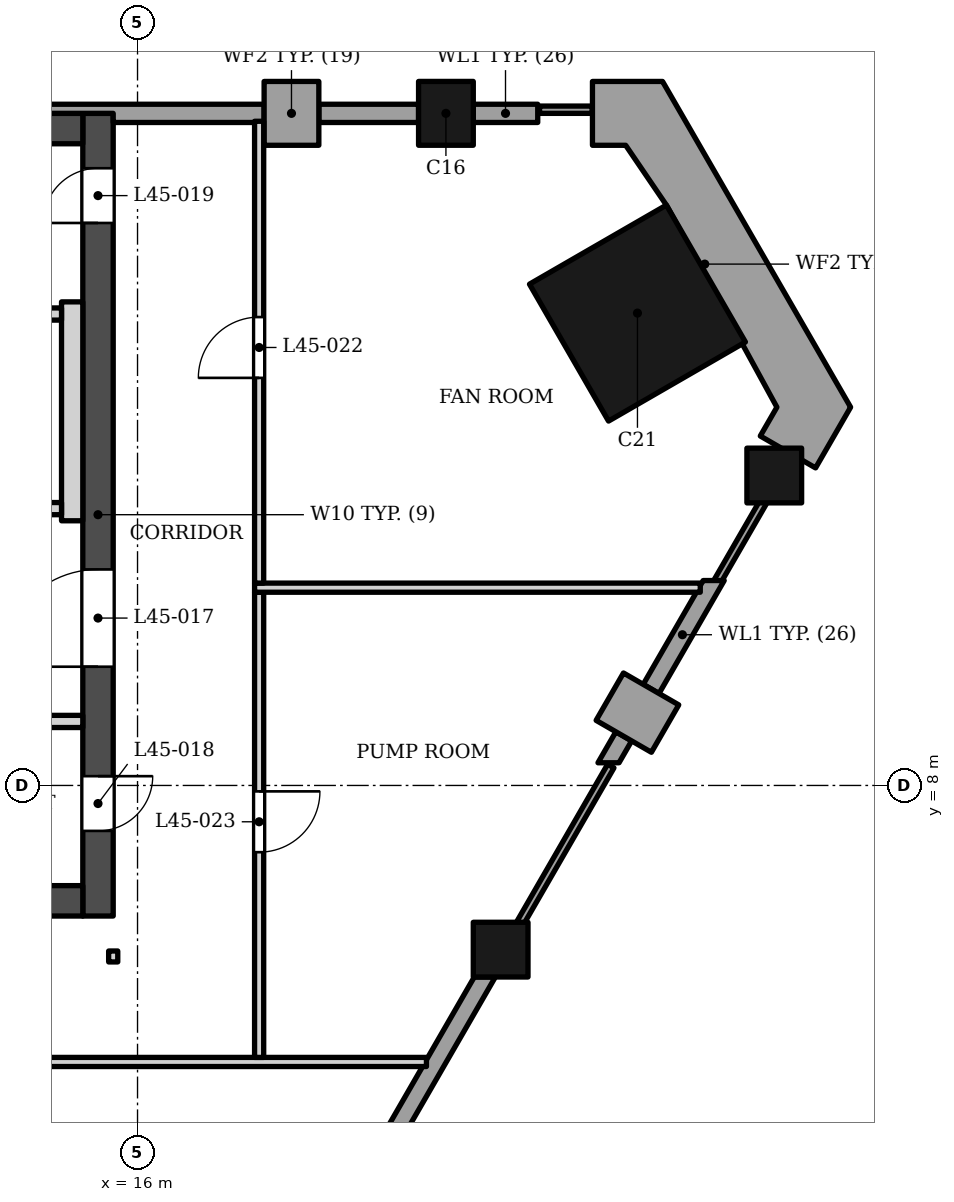
"""IFC4 building model, lengths in metres.
Left out: names, types, materials, properties, quantities, classifications, styles, units other than length and angle.
Written with IfcOpenShell. Run it as: python <this file> out.ifc"""

import sys

from ifc_helpers import new_model, si_unit, direction, frame, frame_2d, origin, origin_2d, place, context, subcontext, project, spatial, polyline, rectangle, outline, extrude, clip, halfspace, element, fill, save


model = new_model("IFC4")
c1 = context("Model", 3, precision=1e-05, world=origin(), true_north=direction((0.0, 1.0)))
c2 = subcontext(c1, "Body", "Model", "MODEL_VIEW")
j1 = project(units=[si_unit("LENGTHUNIT", "METRE"), si_unit("PLANEANGLEUNIT", "RADIAN")], contexts=[c1])
p1 = place(None, origin())
s1 = spatial("IfcSite", under=j1, at=p1, CompositionType="ELEMENT")
p2 = place(p1, origin())
s2 = spatial("IfcBuilding", under=s1, at=p2, CompositionType="ELEMENT")
p3 = place(p2, frame((0.0, 0.0, 191.4)))
s3 = spatial("IfcBuildingStorey", under=s2, at=p3, CompositionType="ELEMENT", Elevation=191.4)
p4 = place(p3, frame((-15.1, 18.802, 0.0), z_axis=(0.0, 0.0, 1.0), x_axis=(1.0, 0.0, 0.0)))
e1 = element("IfcWall", 1, at=p4, inside=s3, PredefinedType="SHEAR", context=c2, shape_type="SweptSolid", body=[
    extrude(rectangle(XDim=30.2, YDim=0.5, at=frame_2d((15.1, 0.0))), origin(), (0.0, 0.0, 1.0), 5.0),
])
p5 = place(p3, frame((12.6, 6.103, 0.0), z_axis=(0.0, 0.0, 1.0), x_axis=(1.0, 0.0, 0.0)))
e2 = element("IfcWall", 2, at=p5, inside=s3, PredefinedType="SHEAR", context=c2, shape_type="SweptSolid", body=[
    extrude(rectangle(XDim=2.5, YDim=0.5, at=frame_2d((1.25, 0.0))), origin(), (0.0, 0.0, 1.0), 5.0),
])
p6 = place(p3, frame((15.35, 5.853, 0.0), z_axis=(0.0, 0.0, 1.0), x_axis=(0.0, 1.0, 0.0)))
e3 = element("IfcWall", 3, at=p6, inside=s3, PredefinedType="SHEAR", context=c2, shape_type="SweptSolid", body=[
    extrude(rectangle(XDim=13.2, YDim=0.5, at=frame_2d((6.6, 0.0))), origin(), (0.0, 0.0, 1.0), 5.0),
])
p7 = place(p6, frame((4.1, 0.0, 0.0)))
e4 = element("IfcOpeningElement", 4, at=p7, cuts=e3, PredefinedType="OPENING", context=c2, shape_type="SweptSolid", body=[
    extrude(rectangle(XDim=1.6, YDim=2.1, at=frame_2d((0.8, 1.05))), frame((0.0, 0.26, 0.0), z_axis=(0.0, -1.0, 0.0), x_axis=(1.0, 0.0, 0.0)), (0.0, 0.0, 1.0), 0.52),
])
p8 = place(p6, frame((1.4, 0.0, 0.0)))
e5 = element("IfcOpeningElement", 5, at=p8, cuts=e3, PredefinedType="OPENING", context=c2, shape_type="SweptSolid", body=[
    extrude(rectangle(XDim=0.9, YDim=2.1, at=frame_2d((0.45, 1.05))), frame((0.0, 0.26, 0.0), z_axis=(0.0, -1.0, 0.0), x_axis=(1.0, 0.0, 0.0)), (0.0, 0.0, 1.0), 0.52),
])
p9 = place(p6, frame((11.397, 0.0, 0.0)))
e6 = element("IfcOpeningElement", 6, at=p9, cuts=e3, PredefinedType="OPENING", context=c2, shape_type="SweptSolid", body=[
    extrude(rectangle(XDim=0.9, YDim=2.1, at=frame_2d((0.45, 1.05))), frame((0.0, 0.26, 0.0), z_axis=(0.0, -1.0, 0.0), x_axis=(1.0, 0.0, 0.0)), (0.0, 0.0, 1.0), 0.52),
])
p10 = place(p3, frame((21.072, 19.053, 0.0), z_axis=(0.0, 0.0, 1.0), x_axis=(-1.0, 0.0, 0.0)))
e7 = element("IfcColumn", 7, at=p10, inside=s3, PredefinedType="COLUMN", context=c2, shape_type="SweptSolid", body=[
    extrude(rectangle(XDim=0.9, YDim=1.05, at=origin_2d()), origin(), (0.0, 0.0, 1.0), 5.0),
])
p11 = place(p3, frame((24.222, 15.768, 0.0), z_axis=(0.0, 0.0, 1.0), x_axis=(-0.866025421238, -0.49999996977, 0.0)))
e8 = element("IfcColumn", 8, at=p11, inside=s3, PredefinedType="COLUMN", context=c2, shape_type="SweptSolid", body=[
    extrude(rectangle(XDim=2.6, YDim=2.6, at=origin_2d()), origin(), (0.0, 0.0, 1.0), 5.0),
])
p12 = place(p3, frame((21.972, 5.3, 0.0), z_axis=(0.259017976058, 0.448708341627, 0.85531895351), x_axis=(-0.86606209647, 0.499936441019, 0.0)))
e9 = element("IfcColumn", 9, at=p12, inside=s3, PredefinedType="COLUMN", context=c2, shape_type="Clipping", body=[
    clip(clip(extrude(rectangle(XDim=0.9, YDim=0.9, at=origin_2d()), origin(), (0.0, 0.0, 1.0), 5.846), halfspace(frame((0.0, 0.0, 0.277), z_axis=(0.0, 0.0, 1.0), x_axis=(1.0, 0.0, 0.0)), True)), halfspace(frame((0.0, 0.0, 5.569), z_axis=(0.0, 0.0, 1.0), x_axis=(1.0, 0.0, 0.0)), False)),
])
p13 = place(p3, frame((26.472, 13.097, 0.0), z_axis=(-0.141163992938, -0.244952781375, 0.959203243319), x_axis=(0.866422676659, -0.499311271023, 0.0)))
e10 = element("IfcColumn", 10, at=p13, inside=s3, PredefinedType="COLUMN", context=c2, shape_type="Clipping", body=[
    clip(clip(extrude(rectangle(XDim=0.9, YDim=0.9, at=origin_2d()), origin(), (0.0, 0.0, 1.0), 5.213), halfspace(frame((0.0, 0.0, 0.137), z_axis=(0.0, 0.0, 1.0), x_axis=(1.0, 0.0, 0.0)), True)), halfspace(frame((0.0, 0.0, 5.076), z_axis=(0.0, 0.0, 1.0), x_axis=(1.0, 0.0, 0.0)), False)),
])
p14 = place(p3, frame((24.676, 8.935, 0.0), z_axis=(0.0, 0.0, 1.0), x_axis=(-0.866030680601, 0.499990860175, 0.0)))
e11 = element("IfcWall", 11, at=p14, inside=s3, PredefinedType="SOLIDWALL", context=c2, shape_type="SweptSolid", body=[
    extrude(rectangle(XDim=1.05, YDim=0.9, at=frame_2d((0.525, 0.0))), origin(), (0.0, 0.0, 1.0), 3.5),
])
p15 = place(p3, origin())
e12 = element("IfcWall", 12, at=p15, inside=s3, PredefinedType="ELEMENTEDWALL", context=c2, shape_type="SweptSolid", body=[
    extrude(outline(polyline([(21.877, 4.836), (21.852, 4.85), (21.538, 4.85), (19.817, 1.868), (20.077, 1.718), (21.877, 4.836)])), origin(), (0.0, 0.0, 1.0), 3.5),
])
p16 = place(p3, origin())
e13 = element("IfcWall", 13, at=p16, inside=s3, PredefinedType="ELEMENTEDWALL", context=c2, shape_type="SweptSolid", body=[
    extrude(outline(polyline([(23.867, 8.883), (23.573, 8.373), (23.919, 8.373), (24.127, 8.733), (23.867, 8.883)])), origin(), (0.0, 0.0, 1.0), 3.5),
])
p17 = place(p3, origin())
e14 = element("IfcWall", 14, at=p17, inside=s3, PredefinedType="ELEMENTEDWALL", context=c2, shape_type="SweptSolid", body=[
    extrude(outline(polyline([(24.577, 9.512), (25.649, 11.37), (25.303, 11.37), (24.317, 9.662), (24.577, 9.512)])), origin(), (0.0, 0.0, 1.0), 3.5),
])
p18 = place(p3, origin())
e15 = element("IfcWall", 15, at=p18, inside=s3, PredefinedType="SOLIDWALL", context=c2, shape_type="SweptSolid", body=[
    extrude(outline(polyline([(18.082, 18.528), (18.982, 18.528), (18.982, 19.578), (18.082, 19.578), (18.082, 18.528)])), origin(), (0.0, 0.0, 1.0), 3.5),
])
p19 = place(p3, origin())
e16 = element("IfcWall", 16, at=p19, inside=s3, PredefinedType="ELEMENTEDWALL", context=c2, shape_type="SweptSolid", body=[
    extrude(outline(polyline([(22.582, 19.203), (21.522, 19.203), (21.522, 18.903), (22.582, 18.903), (22.582, 19.203)])), origin(), (0.0, 0.0, 1.0), 3.5),
])
p20 = place(p3, origin())
e17 = element("IfcWall", 17, at=p20, inside=s3, PredefinedType="ELEMENTEDWALL", context=c2, shape_type="SweptSolid", body=[
    extrude(outline(polyline([(18.982, 18.903), (20.622, 18.903), (20.622, 19.203), (18.982, 19.203), (18.982, 18.903)])), origin(), (0.0, 0.0, 1.0), 3.5),
])
p21 = place(p3, origin())
e18 = element("IfcWall", 18, at=p21, inside=s3, PredefinedType="ELEMENTEDWALL", context=c2, shape_type="SweptSolid", body=[
    extrude(outline(polyline([(18.082, 19.203), (14.482, 19.203), (14.482, 19.052), (15.6, 19.052), (15.6, 18.903), (18.082, 18.903), (18.082, 19.203)])), origin(), (0.0, 0.0, 1.0), 3.5),
])
p22 = place(p3, origin())
e19 = element("IfcWall", 19, at=p22, inside=s3, PredefinedType="SOLIDWALL", context=c2, shape_type="SweptSolid", body=[
    extrude(outline(polyline([(26.242, 13.747), (27.151, 13.222), (27.728, 14.22), (24.635, 19.578), (23.482, 19.578), (23.482, 18.528), (24.029, 18.528), (24.698, 17.544), (26.515, 14.22), (26.242, 13.747)])), origin(), (0.0, 0.0, 1.0), 3.5),
])
p23 = place(p3, frame((22.216, 5.604, 0.0), z_axis=(0.0, 0.0, 1.0), x_axis=(0.499958394027, 0.866049423672, 0.0)))
e20 = element("IfcWall", 20, at=p23, inside=s3, PredefinedType="SOLIDWALL", context=c2, shape_type="SweptSolid", body=[
    extrude(rectangle(XDim=3.135, YDim=0.12, at=frame_2d((1.567, 0.0))), origin(), (0.0, 0.0, 1.0), 3.5),
])
p24 = place(p3, frame((25.539, 11.359, 0.0), z_axis=(0.0, 0.0, 1.0), x_axis=(0.500077627542, 0.865980580863, 0.0)))
e21 = element("IfcWall", 21, at=p24, inside=s3, PredefinedType="SOLIDWALL", context=c2, shape_type="SweptSolid", body=[
    extrude(rectangle(XDim=1.587, YDim=0.12, at=frame_2d((0.793, 0.0))), origin(), (0.0, 0.0, 1.0), 3.5),
])
p25 = place(p3, frame((22.612, 19.113, 0.0), z_axis=(0.0, 0.0, 1.0), x_axis=(1.0, 0.0, 0.0)))
e22 = element("IfcWall", 22, at=p25, inside=s3, PredefinedType="SOLIDWALL", context=c2, shape_type="SweptSolid", body=[
    extrude(rectangle(XDim=0.866, YDim=0.12, at=frame_2d((0.433, 0.0))), origin(), (0.0, 0.0, 1.0), 3.5),
])
p26 = place(p3, frame((12.6, 9.052, 0.0), z_axis=(0.0, 0.0, 1.0), x_axis=(1.0, 0.0, 0.0)))
e23 = element("IfcWall", 23, at=p26, inside=s3, PredefinedType="PARTITIONING", context=c2, shape_type="SweptSolid", body=[
    extrude(rectangle(XDim=2.5, YDim=0.2, at=frame_2d((1.25, 0.0))), origin(), (0.0, 0.0, 1.0), 4.83),
])
p27 = place(p3, frame((14.925, 12.353, 0.0), z_axis=(0.0, 0.0, 1.0), x_axis=(0.0, 1.0, 0.0)))
e24 = element("IfcWall", 24, at=p27, inside=s3, PredefinedType="SOLIDWALL", context=c2, shape_type="SweptSolid", body=[
    extrude(rectangle(XDim=3.6, YDim=0.35, at=frame_2d((1.8, 0.0))), origin(), (0.0, 0.0, 1.0), 4.83),
])
p28 = place(p3, frame((12.6, 12.552, 0.0), z_axis=(0.0, 0.0, 1.0), x_axis=(1.0, 0.0, 0.0)))
e25 = element("IfcWall", 25, at=p28, inside=s3, PredefinedType="SOLIDWALL", context=c2, shape_type="SweptSolid", body=[
    extrude(rectangle(XDim=2.15, YDim=0.2, at=frame_2d((1.075, 0.0))), origin(), (0.0, 0.0, 1.0), 4.83),
])
p29 = place(p28, frame((0.475, 0.0, 0.0)))
e26 = element("IfcOpeningElement", 26, at=p29, cuts=e25, PredefinedType="OPENING", context=c2, shape_type="SweptSolid", body=[
    extrude(rectangle(XDim=1.2, YDim=2.1, at=frame_2d((0.6, 1.05))), frame((0.0, 0.11, 0.0), z_axis=(0.0, -1.0, 0.0), x_axis=(1.0, 0.0, 0.0)), (0.0, 0.0, 1.0), 0.22),
])
p30 = place(p3, frame((12.6, 15.753, 0.0), z_axis=(0.0, 0.0, 1.0), x_axis=(1.0, 0.0, 0.0)))
e27 = element("IfcWall", 27, at=p30, inside=s3, PredefinedType="SOLIDWALL", context=c2, shape_type="SweptSolid", body=[
    extrude(rectangle(XDim=2.15, YDim=0.2, at=frame_2d((1.075, 0.0))), origin(), (0.0, 0.0, 1.0), 4.83),
])
p31 = place(p3, frame((4.495, 3.453, 0.0), z_axis=(0.0, 0.0, 1.0), x_axis=(1.0, 0.0, 0.0)))
e28 = element("IfcWall", 28, at=p31, inside=s3, PredefinedType="PARTITIONING", context=c2, shape_type="SweptSolid", body=[
    extrude(rectangle(XDim=16.257, YDim=0.15, at=frame_2d((8.128, 0.0))), origin(), (0.0, 0.0, 1.0), 3.984),
])
p32 = place(p3, frame((18.0, 3.528, 0.0), z_axis=(0.0, 0.0, 1.0), x_axis=(0.0, 1.0, 0.0)))
e29 = element("IfcWall", 29, at=p32, inside=s3, PredefinedType="PARTITIONING", context=c2, shape_type="SweptSolid", body=[
    extrude(rectangle(XDim=7.65, YDim=0.15, at=frame_2d((3.825, 0.0))), origin(), (0.0, 0.0, 1.0), 4.05),
])
p33 = place(p32, frame((3.375, 0.0, 0.0)))
e30 = element("IfcOpeningElement", 30, at=p33, cuts=e29, PredefinedType="OPENING", context=c2, shape_type="SweptSolid", body=[
    extrude(rectangle(XDim=1.0, YDim=2.1, at=frame_2d((0.5, 1.05))), frame((0.0, 0.085, 0.0), z_axis=(0.0, -1.0, 0.0), x_axis=(1.0, 0.0, 0.0)), (0.0, 0.0, 1.0), 0.17),
])
p34 = place(p3, frame((15.6, 5.098, 0.0), z_axis=(0.0, 0.0, 1.0), x_axis=(0.0, 1.0, 0.0)))
e31 = element("IfcWall", 31, at=p34, inside=s3, PredefinedType="PARTITIONING", context=c2, shape_type="SweptSolid", body=[
    extrude(rectangle(XDim=0.18, YDim=0.15, at=frame_2d((0.09, 0.0))), origin(), (0.0, 0.0, 1.0), 4.83),
])
p35 = place(p3, frame((17.925, 11.253, 0.0), z_axis=(0.0, 0.0, 1.0), x_axis=(1.0, 0.0, 0.0)))
e32 = element("IfcWall", 32, at=p35, inside=s3, PredefinedType="PARTITIONING", context=c2, shape_type="SweptSolid", body=[
    extrude(rectangle(XDim=7.33, YDim=0.15, at=frame_2d((3.665, 0.0))), origin(), (0.0, 0.0, 1.0), 4.13),
])
p36 = place(p3, frame((18.0, 11.328, 0.0), z_axis=(0.0, 0.0, 1.0), x_axis=(0.0, 1.0, 0.0)))
e33 = element("IfcWall", 33, at=p36, inside=s3, PredefinedType="PARTITIONING", context=c2, shape_type="SweptSolid", body=[
    extrude(rectangle(XDim=7.595, YDim=0.15, at=frame_2d((3.797, 0.0))), origin(), (0.0, 0.0, 1.0), 4.83),
])
p37 = place(p36, frame((3.375, 0.0, 0.0)))
e34 = element("IfcOpeningElement", 34, at=p37, cuts=e33, PredefinedType="OPENING", context=c2, shape_type="SweptSolid", body=[
    extrude(rectangle(XDim=1.0, YDim=2.1, at=frame_2d((0.5, 1.05))), frame((0.0, 0.085, 0.0), z_axis=(0.0, -1.0, 0.0), x_axis=(1.0, 0.0, 0.0)), (0.0, 0.0, 1.0), 0.17),
])
p38 = place(p7, origin())
e35 = element("IfcDoor", 35, at=p38, inside=s3, OperationType="DOUBLE_DOOR_SINGLE_SWING", PredefinedType="DOOR", context=c2, shape_type="SweptSolid", body=[
    extrude(rectangle(XDim=1.6, YDim=2.1, at=frame_2d((0.8, 1.05))), frame((0.0, 0.025, 0.0), z_axis=(0.0, -1.0, 0.0), x_axis=(1.0, 0.0, 0.0)), (0.0, 0.0, 1.0), 0.05),
])
fill(e4, e35)
p39 = place(p8, origin())
e36 = element("IfcDoor", 36, at=p39, inside=s3, OperationType="SINGLE_SWING_RIGHT", PredefinedType="DOOR", context=c2, shape_type="SweptSolid", body=[
    extrude(rectangle(XDim=0.9, YDim=2.1, at=frame_2d((0.45, 1.05))), frame((0.0, 0.025, 0.0), z_axis=(0.0, -1.0, 0.0), x_axis=(1.0, 0.0, 0.0)), (0.0, 0.0, 1.0), 0.05),
])
fill(e5, e36)
p40 = place(p9, origin())
e37 = element("IfcDoor", 37, at=p40, inside=s3, OperationType="SINGLE_SWING_LEFT", PredefinedType="DOOR", context=c2, shape_type="SweptSolid", body=[
    extrude(rectangle(XDim=0.9, YDim=2.1, at=frame_2d((0.45, 1.05))), frame((0.0, 0.025, 0.0), z_axis=(0.0, -1.0, 0.0), x_axis=(1.0, 0.0, 0.0)), (0.0, 0.0, 1.0), 0.05),
])
fill(e6, e37)
p41 = place(p37, origin())
e38 = element("IfcDoor", 38, at=p41, inside=s3, OperationType="SINGLE_SWING_LEFT", PredefinedType="DOOR", context=c2, shape_type="SweptSolid", body=[
    extrude(rectangle(XDim=1.0, YDim=2.1, at=frame_2d((0.5, 1.05))), frame((0.0, 0.025, 0.0), z_axis=(0.0, -1.0, 0.0), x_axis=(1.0, 0.0, 0.0)), (0.0, 0.0, 1.0), 0.05),
])
fill(e34, e38)
p42 = place(p33, origin())
e39 = element("IfcDoor", 39, at=p42, inside=s3, OperationType="SINGLE_SWING_RIGHT", PredefinedType="DOOR", context=c2, shape_type="SweptSolid", body=[
    extrude(rectangle(XDim=1.0, YDim=2.1, at=frame_2d((0.5, 1.05))), frame((0.0, 0.025, 0.0), z_axis=(0.0, -1.0, 0.0), x_axis=(1.0, 0.0, 0.0)), (0.0, 0.0, 1.0), 0.05),
])
fill(e30, e39)
save(model, sys.argv[1])
